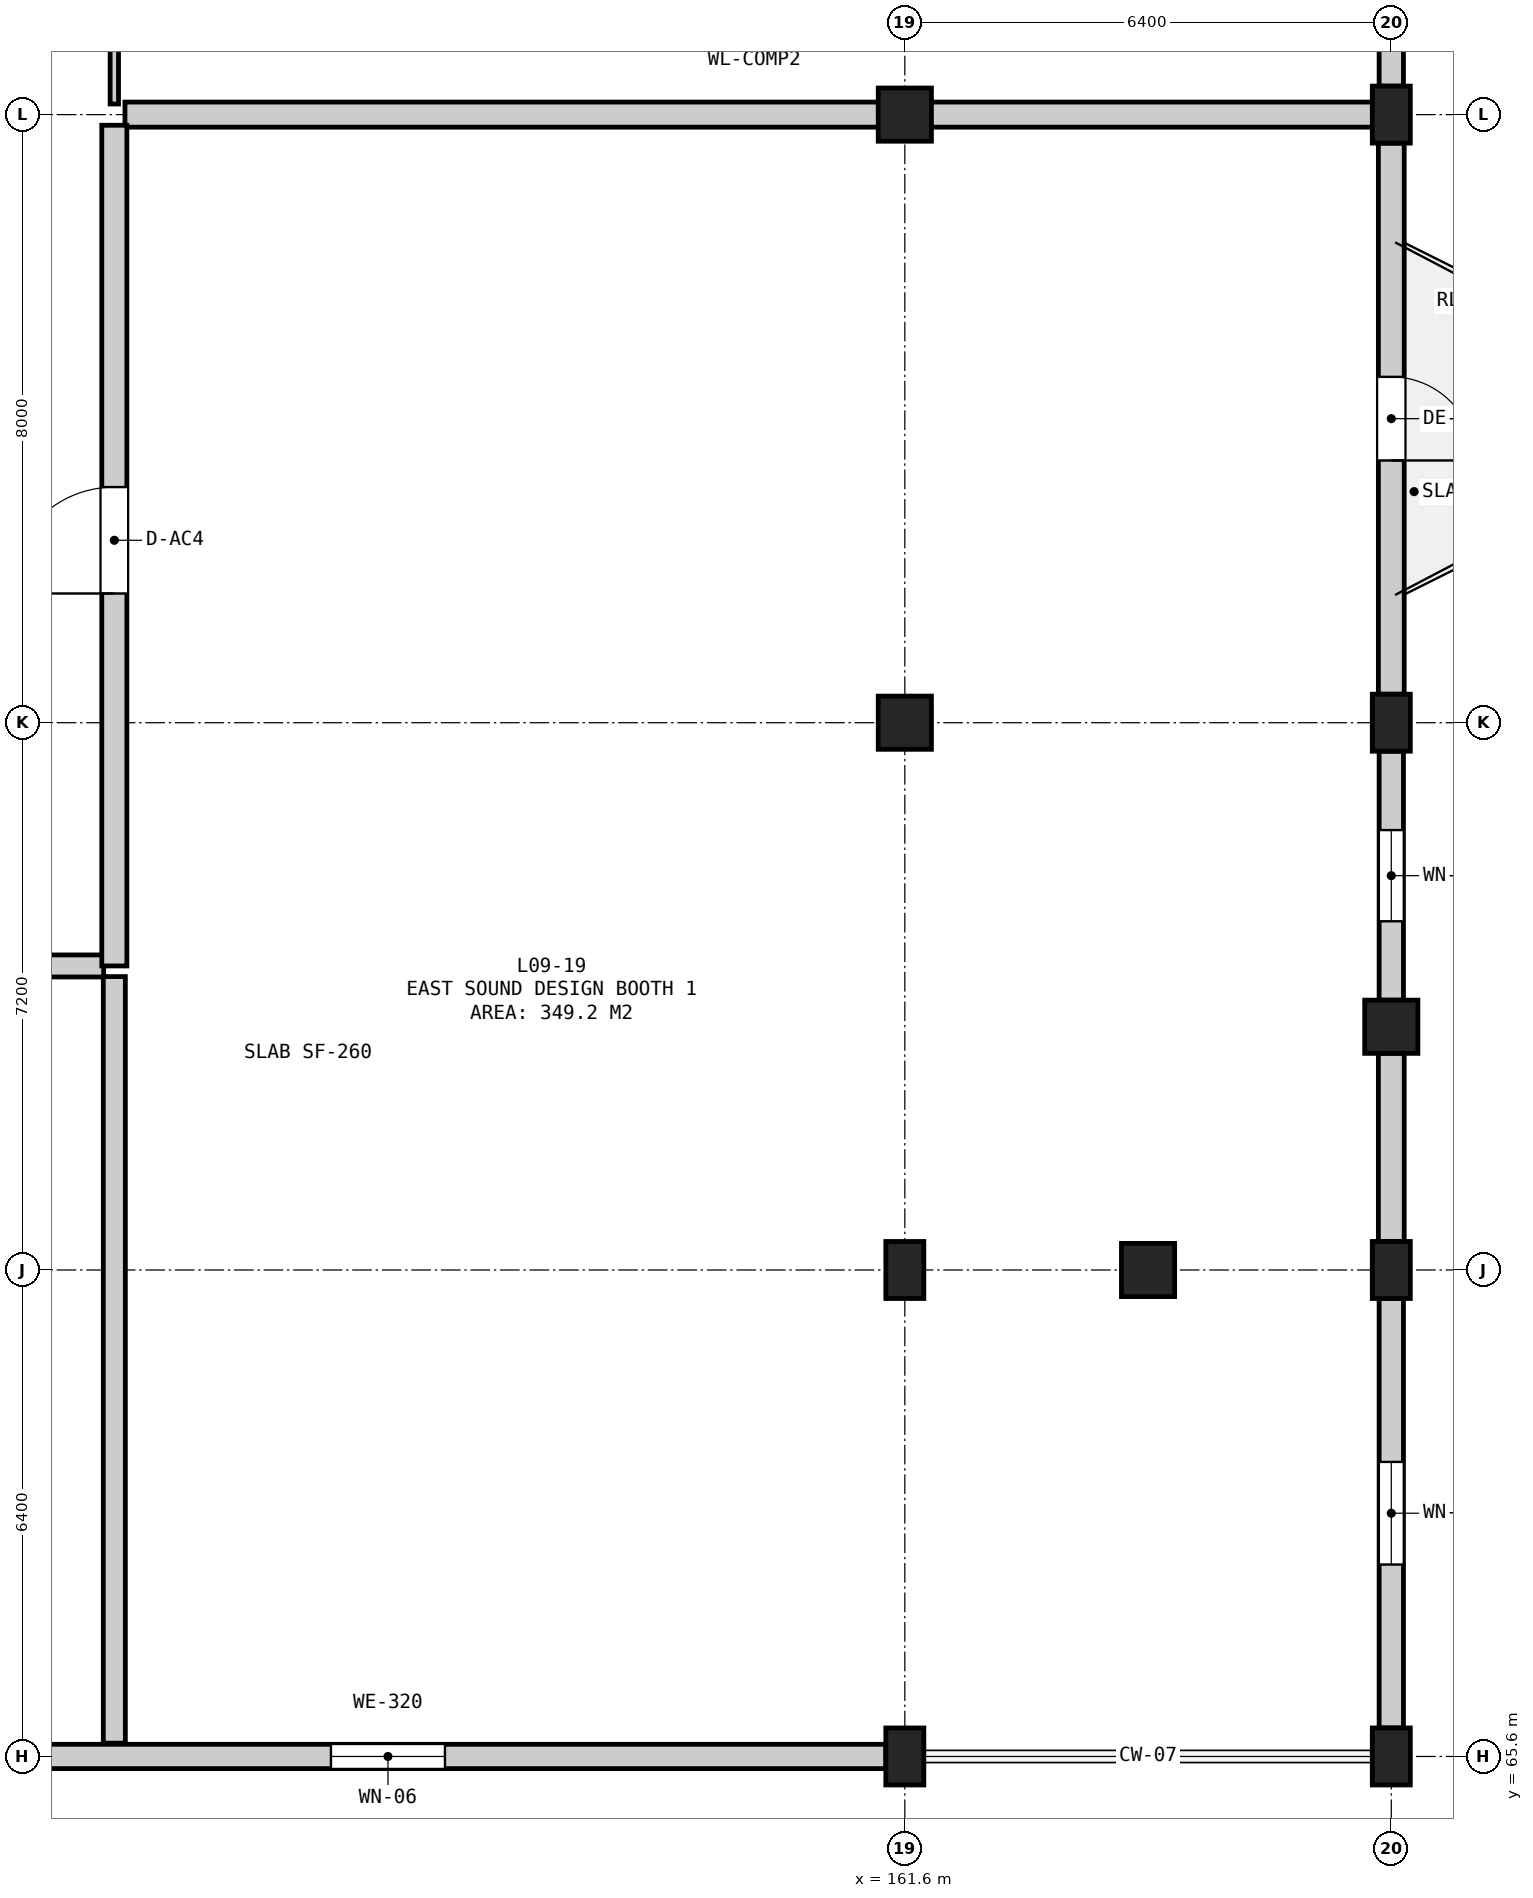
"""IFC4 building model, lengths in metres.
Left out: names, types, materials, properties, quantities, classifications, styles, units other than length and angle.
Written with IfcOpenShell. Run it as: python <this file> out.ifc"""

import sys

from ifc_helpers import new_model, si_unit, direction, frame, frame_2d, origin, origin_2d, place, context, subcontext, project, spatial, rectangle, circle, extrude, element, fill, save


model = new_model("IFC4")
c1 = context("Model", 3, precision=1e-05, world=origin(), true_north=direction((0.0, 1.0)))
c2 = subcontext(c1, "Body", "Model", "MODEL_VIEW")
j1 = project(units=[si_unit("LENGTHUNIT", "METRE"), si_unit("PLANEANGLEUNIT", "RADIAN")], contexts=[c1])
p1 = place(None, origin())
s1 = spatial("IfcSite", under=j1, at=p1, CompositionType="ELEMENT")
p2 = place(p1, origin())
s2 = spatial("IfcBuilding", under=s1, at=p2, CompositionType="ELEMENT")
p3 = place(p2, frame((0.0, 0.0, 39.5)))
s3 = spatial("IfcBuildingStorey", under=s2, at=p3, CompositionType="ELEMENT", Elevation=39.5)
for number, where, z_axis, x_axis in (
    (1, (161.6, 65.6, 0.0), (0.0, 0.0, 1.0), (1.0, 0.0, 0.0)),
    (2, (161.6, 72.0, 0.0), (0.0, 0.0, 1.0), (1.0, 0.0, 0.0)),
):
    element("IfcColumn", number, at=place(p3, frame(where, z_axis=z_axis, x_axis=x_axis)), inside=s3, PredefinedType="COLUMN", context=c2, shape_type="SweptSolid", body=[
        extrude(rectangle(XDim=0.5, YDim=0.75, at=origin_2d()), origin(), (0.0, 0.0, 1.0), 3.8),
    ])
for number, where, z_axis, x_axis in (
    (3, (161.6, 79.2, 0.0), (0.0, 0.0, 1.0), (1.0, 0.0, 0.0)),
    (4, (161.6, 87.2, 0.0), (0.0, 0.0, 1.0), (1.0, 0.0, 0.0)),
):
    element("IfcColumn", number, at=place(p3, frame(where, z_axis=z_axis, x_axis=x_axis)), inside=s3, PredefinedType="COLUMN", context=c2, shape_type="SweptSolid", body=[
        extrude(rectangle(XDim=0.7, YDim=0.7, at=origin_2d()), origin(), (0.0, 0.0, 1.0), 3.8),
    ])
p4 = place(p3, frame((164.8, 72.0, 0.0), z_axis=(0.0, 0.0, 1.0), x_axis=(1.0, 0.0, 0.0)))
e5 = element("IfcColumn", 5, at=p4, inside=s3, PredefinedType="COLUMN", context=c2, shape_type="SweptSolid", body=[
    extrude(circle(Radius=0.35, at=origin_2d()), origin(), (0.0, 0.0, 1.0), 3.8),
])
for number, where, z_axis, x_axis in (
    (6, (168.0, 65.6, 0.0), (0.0, 0.0, 1.0), (1.0, 0.0, 0.0)),
    (7, (168.0, 72.0, 0.0), (0.0, 0.0, 1.0), (1.0, 0.0, 0.0)),
):
    element("IfcColumn", number, at=place(p3, frame(where, z_axis=z_axis, x_axis=x_axis)), inside=s3, PredefinedType="COLUMN", context=c2, shape_type="SweptSolid", body=[
        extrude(rectangle(XDim=0.5, YDim=0.75, at=origin_2d()), origin(), (0.0, 0.0, 1.0), 3.8),
    ])
p5 = place(p3, frame((168.0, 75.2, 0.0), z_axis=(0.0, 0.0, 1.0), x_axis=(1.0, 0.0, 0.0)))
e8 = element("IfcColumn", 8, at=p5, inside=s3, PredefinedType="COLUMN", context=c2, shape_type="SweptSolid", body=[
    extrude(circle(Radius=0.35, at=origin_2d()), origin(), (0.0, 0.0, 1.0), 3.8),
])
for number, where, z_axis, x_axis in (
    (9, (168.0, 79.2, 0.0), (0.0, 0.0, 1.0), (1.0, 0.0, 0.0)),
    (10, (168.0, 87.2, 0.0), (0.0, 0.0, 1.0), (1.0, 0.0, 0.0)),
):
    element("IfcColumn", number, at=place(p3, frame(where, z_axis=z_axis, x_axis=x_axis)), inside=s3, PredefinedType="COLUMN", context=c2, shape_type="SweptSolid", body=[
        extrude(rectangle(XDim=0.5, YDim=0.75, at=origin_2d()), origin(), (0.0, 0.0, 1.0), 3.8),
    ])
p6 = place(p3, frame((148.25, 65.6, 0.0), z_axis=(0.0, 0.0, 1.0), x_axis=(1.0, 0.0, 0.0)))
e11 = element("IfcWall", 11, at=p6, inside=s3, PredefinedType="SOLIDWALL", context=c2, shape_type="SweptSolid", body=[
    extrude(rectangle(XDim=13.1, YDim=0.32, at=frame_2d((6.55, 0.0))), origin(), (0.0, 0.0, 1.0), 2.925),
])
p7 = place(p6, frame((5.8, 0.0, 0.9)))
e12 = element("IfcOpeningElement", 12, at=p7, cuts=e11, PredefinedType="OPENING", context=c2, shape_type="SweptSolid", body=[
    extrude(rectangle(XDim=1.5, YDim=1.85, at=frame_2d((0.75, 0.925))), frame((0.0, 0.172, 0.0), z_axis=(0.0, -1.0, 0.0), x_axis=(1.0, 0.0, 0.0)), (0.0, 0.0, 1.0), 0.344),
])
p8 = place(p3, frame((168.0, 65.975, 0.0), z_axis=(0.0, 0.0, 1.0), x_axis=(0.0, 1.0, 0.0)))
e13 = element("IfcWall", 13, at=p8, inside=s3, PredefinedType="SOLIDWALL", context=c2, shape_type="SweptSolid", body=[
    extrude(rectangle(XDim=5.65, YDim=0.32, at=frame_2d((2.825, 0.0))), origin(), (0.0, 0.0, 1.0), 2.94),
])
p9 = place(p8, frame((2.15, 0.0, 0.9)))
e14 = element("IfcOpeningElement", 14, at=p9, cuts=e13, PredefinedType="OPENING", context=c2, shape_type="SweptSolid", body=[
    extrude(rectangle(XDim=1.35, YDim=1.75, at=frame_2d((0.675, 0.875))), frame((0.0, 0.172, 0.0), z_axis=(0.0, -1.0, 0.0), x_axis=(1.0, 0.0, 0.0)), (0.0, 0.0, 1.0), 0.344),
])
p10 = place(p3, frame((168.0, 72.375, 0.0), z_axis=(0.0, 0.0, 1.0), x_axis=(0.0, 1.0, 0.0)))
e15 = element("IfcWall", 15, at=p10, inside=s3, PredefinedType="SOLIDWALL", context=c2, shape_type="SweptSolid", body=[
    extrude(rectangle(XDim=2.475, YDim=0.34, at=frame_2d((1.238, 0.0))), origin(), (0.0, 0.0, 1.0), 2.94),
])
p11 = place(p3, frame((168.0, 75.55, 0.0), z_axis=(0.0, 0.0, 1.0), x_axis=(0.0, 1.0, 0.0)))
e16 = element("IfcWall", 16, at=p11, inside=s3, PredefinedType="SOLIDWALL", context=c2, shape_type="SweptSolid", body=[
    extrude(rectangle(XDim=3.275, YDim=0.32, at=frame_2d((1.637, 0.0))), origin(), (0.0, 0.0, 1.0), 2.94),
])
p12 = place(p11, frame((1.038, 0.0, 0.9)))
e17 = element("IfcOpeningElement", 17, at=p12, cuts=e16, PredefinedType="OPENING", context=c2, shape_type="SweptSolid", body=[
    extrude(rectangle(XDim=1.2, YDim=1.7, at=frame_2d((0.6, 0.85))), frame((0.0, 0.172, 0.0), z_axis=(0.0, -1.0, 0.0), x_axis=(1.0, 0.0, 0.0)), (0.0, 0.0, 1.0), 0.344),
])
p13 = place(p3, frame((168.0, 79.575, 0.0), z_axis=(0.0, 0.0, 1.0), x_axis=(0.0, 1.0, 0.0)))
e18 = element("IfcWall", 18, at=p13, inside=s3, PredefinedType="SOLIDWALL", context=c2, shape_type="SweptSolid", body=[
    extrude(rectangle(XDim=7.25, YDim=0.34, at=frame_2d((3.625, 0.0))), origin(), (0.0, 0.0, 1.0), 2.94),
])
p14 = place(p13, frame((3.075, 0.0, 0.0)))
e19 = element("IfcOpeningElement", 19, at=p14, cuts=e18, PredefinedType="OPENING", context=c2, shape_type="SweptSolid", body=[
    extrude(rectangle(XDim=1.1, YDim=2.2, at=frame_2d((0.55, 1.1))), frame((0.0, 0.182, 0.0), z_axis=(0.0, -1.0, 0.0), x_axis=(1.0, 0.0, 0.0)), (0.0, 0.0, 1.0), 0.364),
])
p15 = place(p3, frame((168.0, 87.575, 0.0), z_axis=(0.0, 0.0, 1.0), x_axis=(0.0, 1.0, 0.0)))
e20 = element("IfcWall", 20, at=p15, inside=s3, PredefinedType="SOLIDWALL", context=c2, shape_type="SweptSolid", body=[
    extrude(rectangle(XDim=7.25, YDim=0.32, at=frame_2d((3.625, 0.0))), origin(), (0.0, 0.0, 1.0), 2.925),
])
p16 = place(p15, frame((2.3, 0.0, 0.9)))
e21 = element("IfcOpeningElement", 21, at=p16, cuts=e20, PredefinedType="OPENING", context=c2, shape_type="SweptSolid", body=[
    extrude(rectangle(XDim=0.95, YDim=1.45, at=frame_2d((0.475, 0.725))), frame((0.0, 0.172, 0.0), z_axis=(0.0, -1.0, 0.0), x_axis=(1.0, 0.0, 0.0)), (0.0, 0.0, 1.0), 0.344),
])
p17 = place(p3, frame((139.74, 76.0, 0.0), z_axis=(0.0, 0.0, 1.0), x_axis=(1.0, 0.0, 0.0)))
e22 = element("IfcWall", 22, at=p17, inside=s3, PredefinedType="SOLIDWALL", context=c2, shape_type="SweptSolid", body=[
    extrude(rectangle(XDim=11.32, YDim=0.29, at=frame_2d((5.66, 0.0))), origin(), (0.0, 0.0, 1.0), 3.52),
])
p18 = place(p17, frame((4.96, 0.0, 0.0)))
e23 = element("IfcOpeningElement", 23, at=p18, cuts=e22, PredefinedType="OPENING", context=c2, shape_type="SweptSolid", body=[
    extrude(rectangle(XDim=1.4, YDim=2.2, at=frame_2d((0.7, 1.1))), frame((0.0, 0.157, 0.0), z_axis=(0.0, -1.0, 0.0), x_axis=(1.0, 0.0, 0.0)), (0.0, 0.0, 1.0), 0.314),
])
p19 = place(p3, frame((151.2, 65.775, 0.0), z_axis=(0.0, 0.0, 1.0), x_axis=(0.0, 1.0, 0.0)))
e24 = element("IfcWall", 24, at=p19, inside=s3, PredefinedType="SOLIDWALL", context=c2, shape_type="SweptSolid", body=[
    extrude(rectangle(XDim=10.085, YDim=0.29, at=frame_2d((5.042, 0.0))), origin(), (0.0, 0.0, 1.0), 3.52),
])
p20 = place(p3, frame((151.34, 87.2, 0.0), z_axis=(0.0, 0.0, 1.0), x_axis=(1.0, 0.0, 0.0)))
e25 = element("IfcWall", 25, at=p20, inside=s3, PredefinedType="SOLIDWALL", context=c2, shape_type="SweptSolid", body=[
    extrude(rectangle(XDim=16.555, YDim=0.33, at=frame_2d((8.277, 0.0))), origin(), (0.0, 0.0, 1.0), 2.485),
])
p21 = place(p3, frame((151.2, 76.0, 0.0), z_axis=(0.0, 0.0, 1.0), x_axis=(0.0, 1.0, 0.0)))
e26 = element("IfcWall", 26, at=p21, inside=s3, PredefinedType="SOLIDWALL", context=c2, shape_type="SweptSolid", body=[
    extrude(rectangle(XDim=11.06, YDim=0.33, at=frame_2d((5.53, 0.0))), origin(), (0.0, 0.0, 1.0), 3.52),
])
p22 = place(p21, frame((4.9, 0.0, 0.0)))
e27 = element("IfcOpeningElement", 27, at=p22, cuts=e26, PredefinedType="OPENING", context=c2, shape_type="SweptSolid", body=[
    extrude(rectangle(XDim=1.4, YDim=2.2, at=frame_2d((0.7, 1.1))), frame((0.0, 0.177, 0.0), z_axis=(0.0, -1.0, 0.0), x_axis=(1.0, 0.0, 0.0)), (0.0, 0.0, 1.0), 0.354),
])
p23 = place(p3, frame((151.2, 87.34, 0.0), z_axis=(0.0, 0.0, 1.0), x_axis=(0.0, 1.0, 0.0)))
e28 = element("IfcWall", 28, at=p23, inside=s3, PredefinedType="PARTITIONING", context=c2, shape_type="SweptSolid", body=[
    extrude(rectangle(XDim=10.92, YDim=0.11, at=frame_2d((5.46, 0.0))), origin(), (0.0, 0.0, 1.0), 3.52),
])
p24 = place(p23, frame((4.935, 0.0, 0.0)))
e29 = element("IfcOpeningElement", 29, at=p24, cuts=e28, PredefinedType="OPENING", context=c2, shape_type="SweptSolid", body=[
    extrude(rectangle(XDim=1.05, YDim=2.15, at=frame_2d((0.525, 1.075))), frame((0.0, 0.067, 0.0), z_axis=(0.0, -1.0, 0.0), x_axis=(1.0, 0.0, 0.0)), (0.0, 0.0, 1.0), 0.134),
])
p25 = place(p7, origin())
e30 = element("IfcWindow", 30, at=p25, inside=s3, PartitioningType="SINGLE_PANEL", PredefinedType="WINDOW", context=c2, shape_type="SweptSolid", body=[
    extrude(rectangle(XDim=1.5, YDim=1.85, at=frame_2d((0.75, 0.925))), frame((0.0, 0.03, 0.0), z_axis=(0.0, -1.0, 0.0), x_axis=(1.0, 0.0, 0.0)), (0.0, 0.0, 1.0), 0.06),
])
fill(e12, e30)
p26 = place(p9, origin())
e31 = element("IfcWindow", 31, at=p26, inside=s3, PartitioningType="SINGLE_PANEL", PredefinedType="WINDOW", context=c2, shape_type="SweptSolid", body=[
    extrude(rectangle(XDim=1.35, YDim=1.75, at=frame_2d((0.675, 0.875))), frame((0.0, 0.03, 0.0), z_axis=(0.0, -1.0, 0.0), x_axis=(1.0, 0.0, 0.0)), (0.0, 0.0, 1.0), 0.06),
])
fill(e14, e31)
p27 = place(p12, origin())
e32 = element("IfcWindow", 32, at=p27, inside=s3, PartitioningType="SINGLE_PANEL", PredefinedType="WINDOW", context=c2, shape_type="SweptSolid", body=[
    extrude(rectangle(XDim=1.2, YDim=1.7, at=frame_2d((0.6, 0.85))), frame((0.0, 0.03, 0.0), z_axis=(0.0, -1.0, 0.0), x_axis=(1.0, 0.0, 0.0)), (0.0, 0.0, 1.0), 0.06),
])
fill(e17, e32)
p28 = place(p14, frame((1.1, 0.0, 0.0), z_axis=(0.0, 0.0, 1.0), x_axis=(-1.0, 0.0, 0.0)))
e33 = element("IfcDoor", 33, at=p28, inside=s3, OperationType="SINGLE_SWING_RIGHT", PredefinedType="DOOR", context=c2, shape_type="SweptSolid", body=[
    extrude(rectangle(XDim=1.1, YDim=2.2, at=frame_2d((0.55, 1.1))), frame((0.0, 0.025, 0.0), z_axis=(0.0, -1.0, 0.0), x_axis=(1.0, 0.0, 0.0)), (0.0, 0.0, 1.0), 0.05),
])
fill(e19, e33)
p29 = place(p22, origin())
e34 = element("IfcDoor", 34, at=p29, inside=s3, OperationType="SINGLE_SWING_LEFT", PredefinedType="DOOR", context=c2, shape_type="SweptSolid", body=[
    extrude(rectangle(XDim=1.4, YDim=2.2, at=frame_2d((0.7, 1.1))), frame((0.0, 0.025, 0.0), z_axis=(0.0, -1.0, 0.0), x_axis=(1.0, 0.0, 0.0)), (0.0, 0.0, 1.0), 0.05),
])
fill(e27, e34)
save(model, sys.argv[1])
